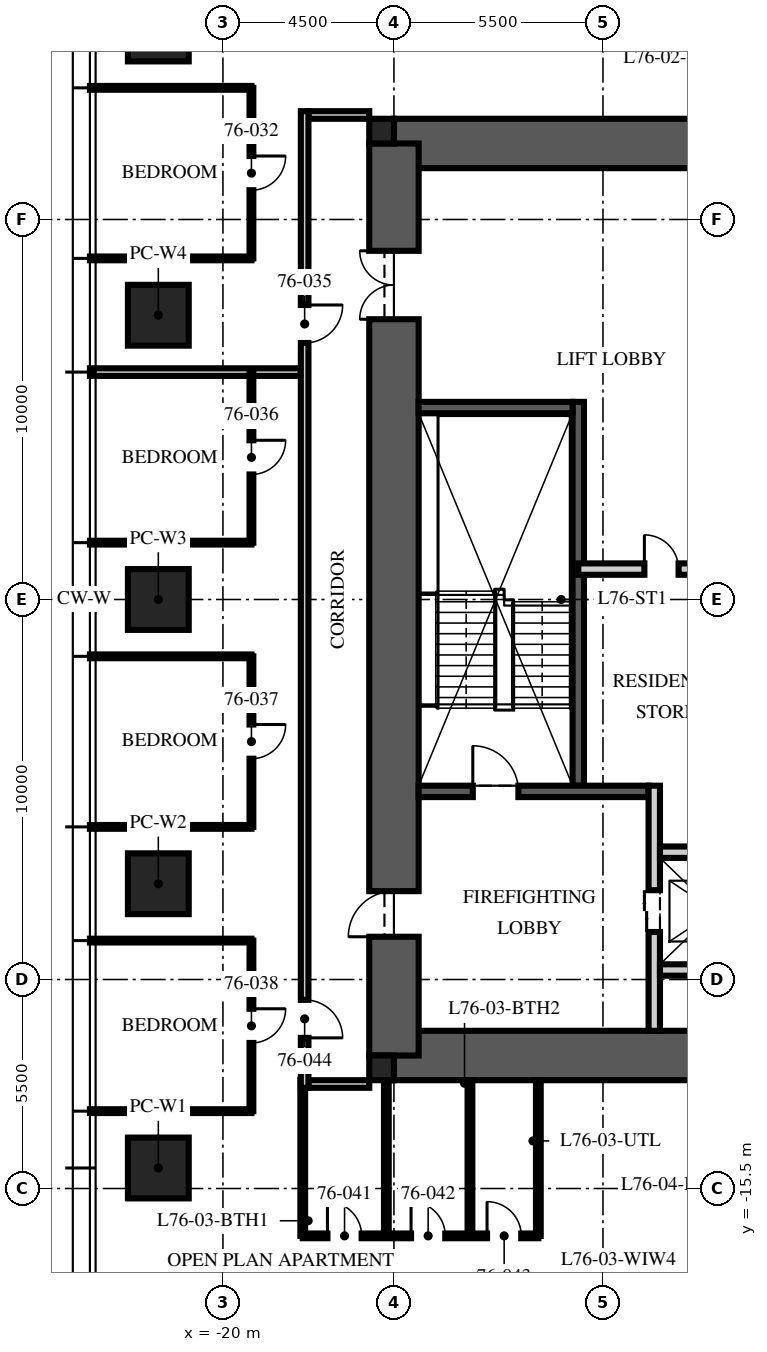
"""IFC4 building model, lengths in metres.
Left out: names, types, materials, properties, quantities, classifications, styles, units other than length and angle.
Written with IfcOpenShell. Run it as: python <this file> out.ifc"""

import sys

from ifc_helpers import new_model, si_unit, direction, frame, frame_2d, origin, origin_2d, place, context, subcontext, project, spatial, rectangle, extrude, element, fill, save


model = new_model("IFC4")
c1 = context("Model", 3, precision=1e-05, world=origin(), true_north=direction((0.0, 1.0)))
c2 = subcontext(c1, "Body", "Model", "MODEL_VIEW")
j1 = project(units=[si_unit("LENGTHUNIT", "METRE"), si_unit("PLANEANGLEUNIT", "RADIAN")], contexts=[c1])
p1 = place(None, origin())
s1 = spatial("IfcSite", under=j1, at=p1, CompositionType="ELEMENT")
p2 = place(p1, origin())
s2 = spatial("IfcBuilding", under=s1, at=p2, CompositionType="ELEMENT")
p3 = place(p2, frame((0.0, 0.0, 304.5)))
s3 = spatial("IfcBuildingStorey", under=s2, at=p3, CompositionType="ELEMENT", Elevation=304.5)
for number, where, z_axis, x_axis in (
    (1, (-15.5, 12.0, -0.25), (0.0, 0.0, 1.0), (1.0, 0.0, 0.0)),
    (2, (-15.5, -12.0, -0.25), (0.0, 0.0, 1.0), (1.0, 0.0, 0.0)),
):
    element("IfcWall", number, at=place(p3, frame(where, z_axis=z_axis, x_axis=x_axis)), inside=s3, PredefinedType="SHEAR", context=c2, shape_type="SweptSolid", body=[
        extrude(rectangle(XDim=31.0, YDim=1.3, at=frame_2d((15.5, 0.0))), origin(), (0.0, 0.0, 1.0), 3.75),
    ])
p4 = place(p3, frame((-15.5, -12.0, -0.25), z_axis=(0.0, 0.0, 1.0), x_axis=(0.0, 1.0, 0.0)))
e3 = element("IfcWall", 3, at=p4, inside=s3, PredefinedType="SHEAR", context=c2, shape_type="SweptSolid", body=[
    extrude(rectangle(XDim=24.0, YDim=1.3, at=frame_2d((12.0, 0.0))), origin(), (0.0, 0.0, 1.0), 3.75),
])
p5 = place(p4, frame((3.125, 0.0, 0.25)))
e4 = element("IfcOpeningElement", 4, at=p5, cuts=e3, PredefinedType="OPENING", context=c2, shape_type="SweptSolid", body=[
    extrude(rectangle(XDim=1.2, YDim=2.1, at=frame_2d((0.6, 1.05))), frame((0.0, 0.66, 0.0), z_axis=(0.0, -1.0, 0.0), x_axis=(1.0, 0.0, 0.0)), (0.0, 0.0, 1.0), 1.32),
])
p6 = place(p4, frame((19.375, 0.0, 0.25)))
e5 = element("IfcOpeningElement", 5, at=p6, cuts=e3, PredefinedType="OPENING", context=c2, shape_type="SweptSolid", body=[
    extrude(rectangle(XDim=1.8, YDim=2.1, at=frame_2d((0.9, 1.05))), frame((0.0, 0.66, 0.0), z_axis=(0.0, -1.0, 0.0), x_axis=(1.0, 0.0, 0.0)), (0.0, 0.0, 1.0), 1.32),
])
for number, where, z_axis, x_axis in (
    (6, (-15.825, 12.325, -0.25), (0.0, 0.0, 1.0), (1.0, 0.0, 0.0)),
    (7, (-15.825, -12.325, -0.25), (0.0, 0.0, 1.0), (1.0, 0.0, 0.0)),
):
    element("IfcColumn", number, at=place(p3, frame(where, z_axis=z_axis, x_axis=x_axis)), inside=s3, PredefinedType="COLUMN", context=c2, shape_type="SweptSolid", body=[
        extrude(rectangle(XDim=0.65, YDim=0.65, at=origin_2d()), origin(), (0.0, 0.0, 1.0), 3.75),
    ])
for number, where, z_axis, x_axis in (
    (8, (-21.7, -14.96, 0.0), (0.0, 0.0, 1.0), (0.0, 1.0, 0.0)),
    (9, (-21.7, -7.48, 0.0), (0.0, 0.0, 1.0), (0.0, 1.0, 0.0)),
    (10, (-21.7, 0.0, 0.0), (0.0, 0.0, 1.0), (0.0, 1.0, 0.0)),
    (11, (-21.7, 7.48, 0.0), (0.0, 0.0, 1.0), (0.0, 1.0, 0.0)),
    (12, (-21.7, 14.96, 0.0), (0.0, 0.0, 1.0), (0.0, 1.0, 0.0)),
):
    element("IfcColumn", number, at=place(p3, frame(where, z_axis=z_axis, x_axis=x_axis)), inside=s3, PredefinedType="COLUMN", context=c2, shape_type="SweptSolid", body=[
        extrude(rectangle(XDim=1.6, YDim=1.6, at=origin_2d()), origin(), (0.0, 0.0, 1.0), 3.75),
    ])
p7 = place(p3, frame((-10.65, -4.9, 0.0), z_axis=(0.0, 0.0, 1.0), x_axis=(0.0, 1.0, 0.0)))
e13 = element("IfcWall", 13, at=p7, inside=s3, PredefinedType="SOLIDWALL", context=c2, shape_type="SweptSolid", body=[
    extrude(rectangle(XDim=10.1, YDim=0.3, at=frame_2d((5.05, 0.0))), origin(), (0.0, 0.0, 1.0), 3.5),
])
p8 = place(p3, frame((-14.85, -5.05, 0.0), z_axis=(0.0, 0.0, 1.0), x_axis=(1.0, 0.0, 0.0)))
e14 = element("IfcWall", 14, at=p8, inside=s3, PredefinedType="SOLIDWALL", context=c2, shape_type="SweptSolid", body=[
    extrude(rectangle(XDim=6.05, YDim=0.3, at=frame_2d((3.025, 0.0))), origin(), (0.0, 0.0, 1.0), 3.5),
])
p9 = place(p8, frame((1.425, 0.0, 0.0)))
e15 = element("IfcOpeningElement", 15, at=p9, cuts=e14, PredefinedType="OPENING", context=c2, shape_type="SweptSolid", body=[
    extrude(rectangle(XDim=1.2, YDim=2.1, at=frame_2d((0.6, 1.05))), frame((0.0, 0.16, 0.0), z_axis=(0.0, -1.0, 0.0), x_axis=(1.0, 0.0, 0.0)), (0.0, 0.0, 1.0), 0.32),
])
p10 = place(p3, frame((-14.85, 5.05, 0.0), z_axis=(0.0, 0.0, 1.0), x_axis=(1.0, 0.0, 0.0)))
e16 = element("IfcWall", 16, at=p10, inside=s3, PredefinedType="SOLIDWALL", context=c2, shape_type="SweptSolid", body=[
    extrude(rectangle(XDim=4.05, YDim=0.3, at=frame_2d((2.025, 0.0))), origin(), (0.0, 0.0, 1.0), 3.5),
])
p11 = place(p3, frame((-8.65, -11.35, 0.0), z_axis=(0.0, 0.0, 1.0), x_axis=(0.0, 1.0, 0.0)))
e17 = element("IfcWall", 17, at=p11, inside=s3, PredefinedType="PARTITIONING", context=c2, shape_type="SweptSolid", body=[
    extrude(rectangle(XDim=6.45, YDim=0.3, at=frame_2d((3.225, 0.0))), origin(), (0.0, 0.0, 1.0), 3.5),
])
p12 = place(p11, frame((2.6, 0.0, 0.0)))
e18 = element("IfcOpeningElement", 18, at=p12, cuts=e17, PredefinedType="OPENING", context=c2, shape_type="SweptSolid", body=[
    extrude(rectangle(XDim=1.1, YDim=2.1, at=frame_2d((0.55, 1.05))), frame((0.0, 0.16, 0.0), z_axis=(0.0, -1.0, 0.0), x_axis=(1.0, 0.0, 0.0)), (0.0, 0.0, 1.0), 0.32),
])
p13 = place(p3, frame((-8.5, -6.65, 0.0), z_axis=(0.0, 0.0, 1.0), x_axis=(1.0, 0.0, 0.0)))
e19 = element("IfcWall", 19, at=p13, inside=s3, PredefinedType="PARTITIONING", context=c2, shape_type="SweptSolid", body=[
    extrude(rectangle(XDim=17.0, YDim=0.3, at=frame_2d((8.5, 0.0))), origin(), (0.0, 0.0, 1.0), 3.5),
])
p14 = place(p13, frame((7.8, 0.0, 0.0)))
e20 = element("IfcOpeningElement", 20, at=p14, cuts=e19, PredefinedType="OPENING", context=c2, shape_type="SweptSolid", body=[
    extrude(rectangle(XDim=1.3, YDim=2.4, at=frame_2d((0.65, 1.2))), frame((0.0, 0.16, 0.0), z_axis=(0.0, -1.0, 0.0), x_axis=(1.0, 0.0, 0.0)), (0.0, 0.0, 1.0), 0.32),
])
p15 = place(p13, frame((5.65, 0.0, 0.0)))
e21 = element("IfcOpeningElement", 21, at=p15, cuts=e19, PredefinedType="OPENING", context=c2, shape_type="SweptSolid", body=[
    extrude(rectangle(XDim=0.9, YDim=2.1, at=frame_2d((0.45, 1.05))), frame((0.0, 0.16, 0.0), z_axis=(0.0, -1.0, 0.0), x_axis=(1.0, 0.0, 0.0)), (0.0, 0.0, 1.0), 0.32),
])
p16 = place(p13, frame((10.4, 0.0, 0.0)))
e22 = element("IfcOpeningElement", 22, at=p16, cuts=e19, PredefinedType="OPENING", context=c2, shape_type="SweptSolid", body=[
    extrude(rectangle(XDim=0.9, YDim=2.1, at=frame_2d((0.45, 1.05))), frame((0.0, 0.16, 0.0), z_axis=(0.0, -1.0, 0.0), x_axis=(1.0, 0.0, 0.0)), (0.0, 0.0, 1.0), 0.32),
])
p17 = place(p3, frame((-8.5, -9.75, 0.0), z_axis=(0.0, 0.0, 1.0), x_axis=(1.0, 0.0, 0.0)))
e23 = element("IfcWall", 23, at=p17, inside=s3, PredefinedType="PARTITIONING", context=c2, shape_type="SweptSolid", body=[
    extrude(rectangle(XDim=2.9, YDim=0.3, at=frame_2d((1.45, 0.0))), origin(), (0.0, 0.0, 1.0), 3.5),
])
p18 = place(p3, frame((-10.65, 0.8, 0.0), z_axis=(0.0, 0.0, 1.0), x_axis=(1.0, 0.0, 0.0)))
e24 = element("IfcWall", 24, at=p18, inside=s3, PredefinedType="PARTITIONING", context=c2, shape_type="SweptSolid", body=[
    extrude(rectangle(XDim=21.3, YDim=0.3, at=frame_2d((10.65, 0.0))), origin(), (0.0, 0.0, 1.0), 3.5),
])
p19 = place(p18, frame((10.05, 0.0, 0.0)))
e25 = element("IfcOpeningElement", 25, at=p19, cuts=e24, PredefinedType="OPENING", context=c2, shape_type="SweptSolid", body=[
    extrude(rectangle(XDim=1.2, YDim=2.1, at=frame_2d((0.6, 1.05))), frame((0.0, 0.16, 0.0), z_axis=(0.0, -1.0, 0.0), x_axis=(1.0, 0.0, 0.0)), (0.0, 0.0, 1.0), 0.32),
])
p20 = place(p18, frame((1.74, 0.0, 0.0)))
e26 = element("IfcOpeningElement", 26, at=p20, cuts=e24, PredefinedType="OPENING", context=c2, shape_type="SweptSolid", body=[
    extrude(rectangle(XDim=0.9, YDim=2.1, at=frame_2d((0.45, 1.05))), frame((0.0, 0.16, 0.0), z_axis=(0.0, -1.0, 0.0), x_axis=(1.0, 0.0, 0.0)), (0.0, 0.0, 1.0), 0.32),
])
for number, where, z_axis, x_axis in (
    (27, (-16.15, 12.75, 0.0), (0.0, 0.0, 1.0), (-1.0, 0.0, 0.0)),
    (28, (-16.15, -12.75, 0.0), (0.0, 0.0, 1.0), (-1.0, 0.0, 0.0)),
):
    element("IfcWall", number, at=place(p3, frame(where, z_axis=z_axis, x_axis=x_axis)), inside=s3, PredefinedType="PARTITIONING", context=c2, shape_type="SweptSolid", body=[
        extrude(rectangle(XDim=1.6, YDim=0.2, at=frame_2d((0.8, 0.0))), origin(), (0.0, 0.0, 1.0), 2.6),
    ])
for number, where, z_axis, x_axis in (
    (29, (-19.25, 13.464, 0.0), (0.0, 0.0, 1.0), (-1.0, 0.0, 0.0)),
    (30, (-19.25, 8.976, 0.0), (0.0, 0.0, 1.0), (-1.0, 0.0, 0.0)),
):
    element("IfcWall", number, at=place(p3, frame(where, z_axis=z_axis, x_axis=x_axis)), inside=s3, PredefinedType="PARTITIONING", context=c2, shape_type="SweptSolid", body=[
        extrude(rectangle(XDim=4.25, YDim=0.1, at=frame_2d((2.125, 0.0))), origin(), (0.0, 0.0, 1.0), 3.01),
    ])
p21 = place(p3, frame((-17.95, 5.984, 0.0), z_axis=(0.0, 0.0, 1.0), x_axis=(-1.0, 0.0, 0.0)))
e31 = element("IfcWall", 31, at=p21, inside=s3, PredefinedType="PARTITIONING", context=c2, shape_type="SweptSolid", body=[
    extrude(rectangle(XDim=5.55, YDim=0.2, at=frame_2d((2.775, 0.0))), origin(), (0.0, 0.0, 1.0), 3.01),
])
for number, where, z_axis, x_axis in (
    (32, (-19.25, 1.496, 0.0), (0.0, 0.0, 1.0), (-1.0, 0.0, 0.0)),
    (33, (-19.25, -1.496, 0.0), (0.0, 0.0, 1.0), (-1.0, 0.0, 0.0)),
    (34, (-19.25, -5.984, 0.0), (0.0, 0.0, 1.0), (-1.0, 0.0, 0.0)),
    (35, (-19.25, -8.976, 0.0), (0.0, 0.0, 1.0), (-1.0, 0.0, 0.0)),
    (36, (-19.25, -13.464, 0.0), (0.0, 0.0, 1.0), (-1.0, 0.0, 0.0)),
):
    element("IfcWall", number, at=place(p3, frame(where, z_axis=z_axis, x_axis=x_axis)), inside=s3, PredefinedType="PARTITIONING", context=c2, shape_type="SweptSolid", body=[
        extrude(rectangle(XDim=4.25, YDim=0.1, at=frame_2d((2.125, 0.0))), origin(), (0.0, 0.0, 1.0), 3.01),
    ])
p22 = place(p3, frame((-19.25, 13.464, 0.0), z_axis=(0.0, 0.0, 1.0), x_axis=(0.0, -1.0, 0.0)))
e37 = element("IfcWall", 37, at=p22, inside=s3, PredefinedType="PARTITIONING", context=c2, shape_type="SweptSolid", body=[
    extrude(rectangle(XDim=4.488, YDim=0.1, at=frame_2d((2.244, 0.0))), origin(), (0.0, 0.0, 1.0), 2.91),
])
p23 = place(p22, frame((1.794, 0.0, 0.0)))
e38 = element("IfcOpeningElement", 38, at=p23, cuts=e37, PredefinedType="OPENING", context=c2, shape_type="SweptSolid", body=[
    extrude(rectangle(XDim=0.9, YDim=2.1, at=frame_2d((0.45, 1.05))), frame((0.0, 0.06, 0.0), z_axis=(0.0, -1.0, 0.0), x_axis=(1.0, 0.0, 0.0)), (0.0, 0.0, 1.0), 0.12),
])
p24 = place(p3, frame((-19.25, 5.984, 0.0), z_axis=(0.0, 0.0, 1.0), x_axis=(0.0, -1.0, 0.0)))
e39 = element("IfcWall", 39, at=p24, inside=s3, PredefinedType="PARTITIONING", context=c2, shape_type="SweptSolid", body=[
    extrude(rectangle(XDim=4.488, YDim=0.1, at=frame_2d((2.244, 0.0))), origin(), (0.0, 0.0, 1.0), 2.91),
])
p25 = place(p24, frame((1.794, 0.0, 0.0)))
e40 = element("IfcOpeningElement", 40, at=p25, cuts=e39, PredefinedType="OPENING", context=c2, shape_type="SweptSolid", body=[
    extrude(rectangle(XDim=0.9, YDim=2.1, at=frame_2d((0.45, 1.05))), frame((0.0, 0.06, 0.0), z_axis=(0.0, -1.0, 0.0), x_axis=(1.0, 0.0, 0.0)), (0.0, 0.0, 1.0), 0.12),
])
p26 = place(p3, frame((-19.25, -1.496, 0.0), z_axis=(0.0, 0.0, 1.0), x_axis=(0.0, -1.0, 0.0)))
e41 = element("IfcWall", 41, at=p26, inside=s3, PredefinedType="PARTITIONING", context=c2, shape_type="SweptSolid", body=[
    extrude(rectangle(XDim=4.488, YDim=0.1, at=frame_2d((2.244, 0.0))), origin(), (0.0, 0.0, 1.0), 2.91),
])
p27 = place(p26, frame((1.794, 0.0, 0.0)))
e42 = element("IfcOpeningElement", 42, at=p27, cuts=e41, PredefinedType="OPENING", context=c2, shape_type="SweptSolid", body=[
    extrude(rectangle(XDim=0.9, YDim=2.1, at=frame_2d((0.45, 1.05))), frame((0.0, 0.06, 0.0), z_axis=(0.0, -1.0, 0.0), x_axis=(1.0, 0.0, 0.0)), (0.0, 0.0, 1.0), 0.12),
])
p28 = place(p3, frame((-19.25, -8.976, 0.0), z_axis=(0.0, 0.0, 1.0), x_axis=(0.0, -1.0, 0.0)))
e43 = element("IfcWall", 43, at=p28, inside=s3, PredefinedType="PARTITIONING", context=c2, shape_type="SweptSolid", body=[
    extrude(rectangle(XDim=4.488, YDim=0.1, at=frame_2d((2.244, 0.0))), origin(), (0.0, 0.0, 1.0), 2.91),
])
p29 = place(p28, frame((1.794, 0.0, 0.0)))
e44 = element("IfcOpeningElement", 44, at=p29, cuts=e43, PredefinedType="OPENING", context=c2, shape_type="SweptSolid", body=[
    extrude(rectangle(XDim=0.9, YDim=2.1, at=frame_2d((0.45, 1.05))), frame((0.0, 0.06, 0.0), z_axis=(0.0, -1.0, 0.0), x_axis=(1.0, 0.0, 0.0)), (0.0, 0.0, 1.0), 0.12),
])
p30 = place(p3, frame((-17.9, -16.746, 0.0), z_axis=(0.0, 0.0, 1.0), x_axis=(1.0, 0.0, 0.0)))
e45 = element("IfcWall", 45, at=p30, inside=s3, PredefinedType="PARTITIONING", context=c2, shape_type="SweptSolid", body=[
    extrude(rectangle(XDim=6.2, YDim=0.125, at=frame_2d((3.1, 0.0))), origin(), (0.0, 0.0, 1.0), 2.9),
])
p31 = place(p30, frame((0.65, 0.0, 0.0)))
e46 = element("IfcOpeningElement", 46, at=p31, cuts=e45, PredefinedType="OPENING", context=c2, shape_type="SweptSolid", body=[
    extrude(rectangle(XDim=0.9, YDim=2.1, at=frame_2d((0.45, 1.05))), frame((0.0, 0.073, 0.0), z_axis=(0.0, -1.0, 0.0), x_axis=(1.0, 0.0, 0.0)), (0.0, 0.0, 1.0), 0.145),
])
p32 = place(p30, frame((2.85, 0.0, 0.0)))
e47 = element("IfcOpeningElement", 47, at=p32, cuts=e45, PredefinedType="OPENING", context=c2, shape_type="SweptSolid", body=[
    extrude(rectangle(XDim=0.9, YDim=2.1, at=frame_2d((0.45, 1.05))), frame((0.0, 0.073, 0.0), z_axis=(0.0, -1.0, 0.0), x_axis=(1.0, 0.0, 0.0)), (0.0, 0.0, 1.0), 0.145),
])
p33 = place(p30, frame((4.85, 0.0, 0.0)))
e48 = element("IfcOpeningElement", 48, at=p33, cuts=e45, PredefinedType="OPENING", context=c2, shape_type="SweptSolid", body=[
    extrude(rectangle(XDim=0.9, YDim=2.1, at=frame_2d((0.45, 1.05))), frame((0.0, 0.073, 0.0), z_axis=(0.0, -1.0, 0.0), x_axis=(1.0, 0.0, 0.0)), (0.0, 0.0, 1.0), 0.145),
])
for number, where, z_axis, x_axis in (
    (49, (-17.9, -12.65, 0.0), (0.0, 0.0, 1.0), (0.0, -1.0, 0.0)),
    (50, (-15.7, -12.65, 0.0), (0.0, 0.0, 1.0), (0.0, -1.0, 0.0)),
):
    element("IfcWall", number, at=place(p3, frame(where, z_axis=z_axis, x_axis=x_axis)), inside=s3, PredefinedType="PARTITIONING", context=c2, shape_type="SweptSolid", body=[
        extrude(rectangle(XDim=4.096, YDim=0.125, at=frame_2d((2.048, 0.0))), origin(), (0.0, 0.0, 1.0), 2.6),
    ])
for number, where, z_axis, x_axis in (
    (51, (-13.5, -12.65, 0.0), (0.0, 0.0, 1.0), (0.0, -1.0, 0.0)),
    (52, (-11.7, -12.65, 0.0), (0.0, 0.0, 1.0), (0.0, -1.0, 0.0)),
):
    element("IfcWall", number, at=place(p3, frame(where, z_axis=z_axis, x_axis=x_axis)), inside=s3, PredefinedType="PARTITIONING", context=c2, shape_type="SweptSolid", body=[
        extrude(rectangle(XDim=4.096, YDim=0.125, at=frame_2d((2.048, 0.0))), origin(), (0.0, 0.0, 1.0), 3.5),
    ])
p34 = place(p3, frame((-17.85, 12.85, 0.0), z_axis=(0.0, 0.0, 1.0), x_axis=(0.0, -1.0, 0.0)))
e53 = element("IfcWall", 53, at=p34, inside=s3, PredefinedType="PARTITIONING", context=c2, shape_type="SweptSolid", body=[
    extrude(rectangle(XDim=25.7, YDim=0.2, at=frame_2d((12.85, 0.0))), origin(), (0.0, 0.0, 1.0), 2.9),
])
p35 = place(p34, frame((5.1, 0.0, 0.0)))
e54 = element("IfcOpeningElement", 54, at=p35, cuts=e53, PredefinedType="OPENING", context=c2, shape_type="SweptSolid", body=[
    extrude(rectangle(XDim=1.0, YDim=2.2, at=frame_2d((0.5, 1.1))), frame((0.0, 0.11, 0.0), z_axis=(0.0, -1.0, 0.0), x_axis=(1.0, 0.0, 0.0)), (0.0, 0.0, 1.0), 0.22),
])
p36 = place(p34, frame((23.386, 0.0, 0.0)))
e55 = element("IfcOpeningElement", 55, at=p36, cuts=e53, PredefinedType="OPENING", context=c2, shape_type="SweptSolid", body=[
    extrude(rectangle(XDim=1.0, YDim=2.2, at=frame_2d((0.5, 1.1))), frame((0.0, 0.11, 0.0), z_axis=(0.0, -1.0, 0.0), x_axis=(1.0, 0.0, 0.0)), (0.0, 0.0, 1.0), 0.22),
])
p37 = place(p9, origin())
e56 = element("IfcDoor", 56, at=p37, inside=s3, OperationType="SINGLE_SWING_LEFT", PredefinedType="DOOR", context=c2, shape_type="SweptSolid", body=[
    extrude(rectangle(XDim=1.2, YDim=2.1, at=frame_2d((0.6, 1.05))), frame((0.0, 0.025, 0.0), z_axis=(0.0, -1.0, 0.0), x_axis=(1.0, 0.0, 0.0)), (0.0, 0.0, 1.0), 0.05),
])
fill(e15, e56)
p38 = place(p5, origin())
e57 = element("IfcDoor", 57, at=p38, inside=s3, OperationType="SINGLE_SWING_LEFT", PredefinedType="DOOR", context=c2, shape_type="SweptSolid", body=[
    extrude(rectangle(XDim=1.2, YDim=2.1, at=frame_2d((0.6, 1.05))), frame((0.0, 0.025, 0.0), z_axis=(0.0, -1.0, 0.0), x_axis=(1.0, 0.0, 0.0)), (0.0, 0.0, 1.0), 0.05),
])
fill(e4, e57)
p39 = place(p6, origin())
e58 = element("IfcDoor", 58, at=p39, inside=s3, OperationType="DOUBLE_DOOR_SINGLE_SWING", PredefinedType="DOOR", context=c2, shape_type="SweptSolid", body=[
    extrude(rectangle(XDim=1.8, YDim=2.1, at=frame_2d((0.9, 1.05))), frame((0.0, 0.025, 0.0), z_axis=(0.0, -1.0, 0.0), x_axis=(1.0, 0.0, 0.0)), (0.0, 0.0, 1.0), 0.05),
])
fill(e5, e58)
p40 = place(p12, origin())
e59 = element("IfcDoor", 59, at=p40, inside=s3, OperationType="DOUBLE_DOOR_SLIDING", PredefinedType="DOOR", context=c2, shape_type="SweptSolid", body=[
    extrude(rectangle(XDim=1.1, YDim=2.1, at=frame_2d((0.55, 1.05))), frame((0.0, 0.025, 0.0), z_axis=(0.0, -1.0, 0.0), x_axis=(1.0, 0.0, 0.0)), (0.0, 0.0, 1.0), 0.05),
])
fill(e18, e59)
p41 = place(p20, origin())
e60 = element("IfcDoor", 60, at=p41, inside=s3, OperationType="SINGLE_SWING_LEFT", PredefinedType="DOOR", context=c2, shape_type="SweptSolid", body=[
    extrude(rectangle(XDim=0.9, YDim=2.1, at=frame_2d((0.45, 1.05))), frame((0.0, 0.025, 0.0), z_axis=(0.0, -1.0, 0.0), x_axis=(1.0, 0.0, 0.0)), (0.0, 0.0, 1.0), 0.05),
])
fill(e26, e60)
p42 = place(p23, origin())
e61 = element("IfcDoor", 61, at=p42, inside=s3, OperationType="SINGLE_SWING_LEFT", PredefinedType="DOOR", context=c2, shape_type="SweptSolid", body=[
    extrude(rectangle(XDim=0.9, YDim=2.1, at=frame_2d((0.45, 1.05))), frame((0.0, 0.025, 0.0), z_axis=(0.0, -1.0, 0.0), x_axis=(1.0, 0.0, 0.0)), (0.0, 0.0, 1.0), 0.05),
])
fill(e38, e61)
p43 = place(p35, origin())
e62 = element("IfcDoor", 62, at=p43, inside=s3, OperationType="SINGLE_SWING_LEFT", PredefinedType="DOOR", context=c2, shape_type="SweptSolid", body=[
    extrude(rectangle(XDim=1.0, YDim=2.2, at=frame_2d((0.5, 1.1))), frame((0.0, 0.025, 0.0), z_axis=(0.0, -1.0, 0.0), x_axis=(1.0, 0.0, 0.0)), (0.0, 0.0, 1.0), 0.05),
])
fill(e54, e62)
p44 = place(p25, origin())
e63 = element("IfcDoor", 63, at=p44, inside=s3, OperationType="SINGLE_SWING_LEFT", PredefinedType="DOOR", context=c2, shape_type="SweptSolid", body=[
    extrude(rectangle(XDim=0.9, YDim=2.1, at=frame_2d((0.45, 1.05))), frame((0.0, 0.025, 0.0), z_axis=(0.0, -1.0, 0.0), x_axis=(1.0, 0.0, 0.0)), (0.0, 0.0, 1.0), 0.05),
])
fill(e40, e63)
p45 = place(p27, origin())
e64 = element("IfcDoor", 64, at=p45, inside=s3, OperationType="SINGLE_SWING_LEFT", PredefinedType="DOOR", context=c2, shape_type="SweptSolid", body=[
    extrude(rectangle(XDim=0.9, YDim=2.1, at=frame_2d((0.45, 1.05))), frame((0.0, 0.025, 0.0), z_axis=(0.0, -1.0, 0.0), x_axis=(1.0, 0.0, 0.0)), (0.0, 0.0, 1.0), 0.05),
])
fill(e42, e64)
p46 = place(p29, origin())
e65 = element("IfcDoor", 65, at=p46, inside=s3, OperationType="SINGLE_SWING_LEFT", PredefinedType="DOOR", context=c2, shape_type="SweptSolid", body=[
    extrude(rectangle(XDim=0.9, YDim=2.1, at=frame_2d((0.45, 1.05))), frame((0.0, 0.025, 0.0), z_axis=(0.0, -1.0, 0.0), x_axis=(1.0, 0.0, 0.0)), (0.0, 0.0, 1.0), 0.05),
])
fill(e44, e65)
p47 = place(p31, origin())
e66 = element("IfcDoor", 66, at=p47, inside=s3, OperationType="SINGLE_SWING_LEFT", PredefinedType="DOOR", context=c2, shape_type="SweptSolid", body=[
    extrude(rectangle(XDim=0.9, YDim=2.1, at=frame_2d((0.45, 1.05))), frame((0.0, 0.025, 0.0), z_axis=(0.0, -1.0, 0.0), x_axis=(1.0, 0.0, 0.0)), (0.0, 0.0, 1.0), 0.05),
])
fill(e46, e66)
p48 = place(p32, origin())
e67 = element("IfcDoor", 67, at=p48, inside=s3, OperationType="SINGLE_SWING_LEFT", PredefinedType="DOOR", context=c2, shape_type="SweptSolid", body=[
    extrude(rectangle(XDim=0.9, YDim=2.1, at=frame_2d((0.45, 1.05))), frame((0.0, 0.025, 0.0), z_axis=(0.0, -1.0, 0.0), x_axis=(1.0, 0.0, 0.0)), (0.0, 0.0, 1.0), 0.05),
])
fill(e47, e67)
p49 = place(p33, origin())
e68 = element("IfcDoor", 68, at=p49, inside=s3, OperationType="SINGLE_SWING_LEFT", PredefinedType="DOOR", context=c2, shape_type="SweptSolid", body=[
    extrude(rectangle(XDim=0.9, YDim=2.1, at=frame_2d((0.45, 1.05))), frame((0.0, 0.025, 0.0), z_axis=(0.0, -1.0, 0.0), x_axis=(1.0, 0.0, 0.0)), (0.0, 0.0, 1.0), 0.05),
])
fill(e48, e68)
p50 = place(p36, origin())
e69 = element("IfcDoor", 69, at=p50, inside=s3, OperationType="SINGLE_SWING_RIGHT", PredefinedType="DOOR", context=c2, shape_type="SweptSolid", body=[
    extrude(rectangle(XDim=1.0, YDim=2.2, at=frame_2d((0.5, 1.1))), frame((0.0, 0.025, 0.0), z_axis=(0.0, -1.0, 0.0), x_axis=(1.0, 0.0, 0.0)), (0.0, 0.0, 1.0), 0.05),
])
fill(e55, e69)
save(model, sys.argv[1])
